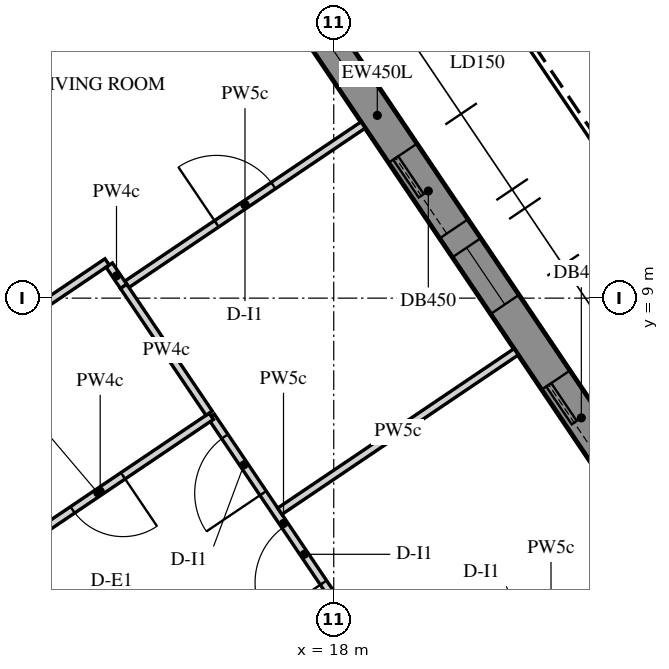
"""IFC4 building model, lengths in metres.
Left out: names, types, materials, properties, quantities, classifications, styles, units other than length and angle.
Written with IfcOpenShell. Run it as: python <this file> out.ifc"""

import sys

from ifc_helpers import new_model, si_unit, direction, frame, frame_2d, origin, place, context, subcontext, project, spatial, polyline, rectangle, outline, extrude, element, fill, save


model = new_model("IFC4")
c1 = context("Model", 3, precision=1e-05, world=origin(), true_north=direction((0.0, 1.0)))
c2 = subcontext(c1, "Body", "Model", "MODEL_VIEW")
j1 = project(units=[si_unit("LENGTHUNIT", "METRE"), si_unit("PLANEANGLEUNIT", "RADIAN")], contexts=[c1])
p1 = place(None, origin())
s1 = spatial("IfcSite", under=j1, at=p1, CompositionType="ELEMENT")
p2 = place(p1, origin())
s2 = spatial("IfcBuilding", under=s1, at=p2, CompositionType="ELEMENT")
p3 = place(p2, frame((0.0, 0.0, 353.4)))
s3 = spatial("IfcBuildingStorey", under=s2, at=p3, CompositionType="ELEMENT", Elevation=353.4)
p4 = place(p3, frame((24.37, 2.811, -0.15), z_axis=(0.0, 0.0, 1.0), x_axis=(-0.559187034749, 0.829041531027, 0.0)))
e1 = element("IfcWall", 1, at=p4, inside=s3, PredefinedType="SOLIDWALL", context=c2, shape_type="SweptSolid", body=[
    extrude(outline(polyline([(0.225, -0.225), (20.506, -0.225), (20.957, 0.225), (-0.225, 0.225), (0.225, -0.225)])), origin(), (0.0, 0.0, 1.0), 3.9),
])
p5 = place(p4, frame((0.325, 0.0, 1.05)))
e2 = element("IfcOpeningElement", 2, at=p5, cuts=e1, PredefinedType="OPENING", context=c2, shape_type="SweptSolid", body=[
    extrude(rectangle(XDim=0.9, YDim=1.5, at=frame_2d((0.45, 0.75))), frame((0.0, 0.235, 0.0), z_axis=(0.0, -1.0, 0.0), x_axis=(1.0, 0.0, 0.0)), (0.0, 0.0, 1.0), 0.47),
])
p6 = place(p4, frame((1.525, 0.0, 0.15)))
e3 = element("IfcOpeningElement", 3, at=p6, cuts=e1, PredefinedType="OPENING", context=c2, shape_type="SweptSolid", body=[
    extrude(rectangle(XDim=1.2, YDim=2.4, at=frame_2d((0.6, 1.2))), frame((0.0, 0.235, 0.0), z_axis=(0.0, -1.0, 0.0), x_axis=(1.0, 0.0, 0.0)), (0.0, 0.0, 1.0), 0.47),
])
p7 = place(p4, frame((3.766, 0.0, 1.05)))
e4 = element("IfcOpeningElement", 4, at=p7, cuts=e1, PredefinedType="OPENING", context=c2, shape_type="SweptSolid", body=[
    extrude(rectangle(XDim=0.9, YDim=1.5, at=frame_2d((0.45, 0.75))), frame((0.0, 0.235, 0.0), z_axis=(0.0, -1.0, 0.0), x_axis=(1.0, 0.0, 0.0)), (0.0, 0.0, 1.0), 0.47),
])
p8 = place(p4, frame((4.966, 0.0, 0.15)))
e5 = element("IfcOpeningElement", 5, at=p8, cuts=e1, PredefinedType="OPENING", context=c2, shape_type="SweptSolid", body=[
    extrude(rectangle(XDim=1.2, YDim=2.4, at=frame_2d((0.6, 1.2))), frame((0.0, 0.235, 0.0), z_axis=(0.0, -1.0, 0.0), x_axis=(1.0, 0.0, 0.0)), (0.0, 0.0, 1.0), 0.47),
])
p9 = place(p4, frame((7.366, 0.0, 1.05)))
e6 = element("IfcOpeningElement", 6, at=p9, cuts=e1, PredefinedType="OPENING", context=c2, shape_type="SweptSolid", body=[
    extrude(rectangle(XDim=0.9, YDim=1.5, at=frame_2d((0.45, 0.75))), frame((0.0, 0.235, 0.0), z_axis=(0.0, -1.0, 0.0), x_axis=(1.0, 0.0, 0.0)), (0.0, 0.0, 1.0), 0.47),
])
p10 = place(p4, frame((8.566, 0.0, 0.15)))
e7 = element("IfcOpeningElement", 7, at=p10, cuts=e1, PredefinedType="OPENING", context=c2, shape_type="SweptSolid", body=[
    extrude(rectangle(XDim=1.2, YDim=2.4, at=frame_2d((0.6, 1.2))), frame((0.0, 0.235, 0.0), z_axis=(0.0, -1.0, 0.0), x_axis=(1.0, 0.0, 0.0)), (0.0, 0.0, 1.0), 0.47),
])
p11 = place(p4, frame((10.966, 0.0, 1.05)))
e8 = element("IfcOpeningElement", 8, at=p11, cuts=e1, PredefinedType="OPENING", context=c2, shape_type="SweptSolid", body=[
    extrude(rectangle(XDim=0.9, YDim=1.5, at=frame_2d((0.45, 0.75))), frame((0.0, 0.235, 0.0), z_axis=(0.0, -1.0, 0.0), x_axis=(1.0, 0.0, 0.0)), (0.0, 0.0, 1.0), 0.47),
])
p12 = place(p4, frame((12.166, 0.0, 0.15)))
e9 = element("IfcOpeningElement", 9, at=p12, cuts=e1, PredefinedType="OPENING", context=c2, shape_type="SweptSolid", body=[
    extrude(rectangle(XDim=1.2, YDim=2.4, at=frame_2d((0.6, 1.2))), frame((0.0, 0.235, 0.0), z_axis=(0.0, -1.0, 0.0), x_axis=(1.0, 0.0, 0.0)), (0.0, 0.0, 1.0), 0.47),
])
p13 = place(p4, frame((14.566, 0.0, 1.05)))
e10 = element("IfcOpeningElement", 10, at=p13, cuts=e1, PredefinedType="OPENING", context=c2, shape_type="SweptSolid", body=[
    extrude(rectangle(XDim=0.9, YDim=1.5, at=frame_2d((0.45, 0.75))), frame((0.0, 0.235, 0.0), z_axis=(0.0, -1.0, 0.0), x_axis=(1.0, 0.0, 0.0)), (0.0, 0.0, 1.0), 0.47),
])
p14 = place(p4, frame((15.766, 0.0, 0.15)))
e11 = element("IfcOpeningElement", 11, at=p14, cuts=e1, PredefinedType="OPENING", context=c2, shape_type="SweptSolid", body=[
    extrude(rectangle(XDim=1.2, YDim=2.4, at=frame_2d((0.6, 1.2))), frame((0.0, 0.235, 0.0), z_axis=(0.0, -1.0, 0.0), x_axis=(1.0, 0.0, 0.0)), (0.0, 0.0, 1.0), 0.47),
])
p15 = place(p4, frame((18.007, 0.0, 1.05)))
e12 = element("IfcOpeningElement", 12, at=p15, cuts=e1, PredefinedType="OPENING", context=c2, shape_type="SweptSolid", body=[
    extrude(rectangle(XDim=0.9, YDim=1.5, at=frame_2d((0.45, 0.75))), frame((0.0, 0.235, 0.0), z_axis=(0.0, -1.0, 0.0), x_axis=(1.0, 0.0, 0.0)), (0.0, 0.0, 1.0), 0.47),
])
p16 = place(p4, frame((19.207, 0.0, 0.15)))
e13 = element("IfcOpeningElement", 13, at=p16, cuts=e1, PredefinedType="OPENING", context=c2, shape_type="SweptSolid", body=[
    extrude(rectangle(XDim=1.2, YDim=2.4, at=frame_2d((0.6, 1.2))), frame((0.0, 0.235, 0.0), z_axis=(0.0, -1.0, 0.0), x_axis=(1.0, 0.0, 0.0)), (0.0, 0.0, 1.0), 0.47),
])
p17 = place(p3, frame((17.873, -1.193, 0.0), z_axis=(0.0, 0.0, 1.0), x_axis=(-0.559195650252, 0.829035719821, 0.0)))
e14 = element("IfcWall", 14, at=p17, inside=s3, PredefinedType="PARTITIONING", context=c2, shape_type="SweptSolid", body=[
    extrude(rectangle(XDim=15.688, YDim=0.15, at=frame_2d((7.844, 0.0))), origin(), (0.0, 0.0, 1.0), 2.82),
])
p18 = place(p17, frame((5.792, 0.0, 0.0)))
e15 = element("IfcOpeningElement", 15, at=p18, cuts=e14, PredefinedType="OPENING", context=c2, shape_type="SweptSolid", body=[
    extrude(rectangle(XDim=1.0, YDim=2.1, at=frame_2d((0.5, 1.05))), frame((0.0, 0.085, 0.0), z_axis=(0.0, -1.0, 0.0), x_axis=(1.0, 0.0, 0.0)), (0.0, 0.0, 1.0), 0.17),
])
p19 = place(p3, frame((11.368, 5.231, 0.0), z_axis=(0.0, 0.0, 1.0), x_axis=(0.55919388604, -0.829036909803, 0.0)))
e16 = element("IfcWall", 16, at=p19, inside=s3, PredefinedType="PARTITIONING", context=c2, shape_type="SweptSolid", body=[
    extrude(rectangle(XDim=7.922, YDim=0.15, at=frame_2d((3.961, 0.0))), origin(), (0.0, 0.0, 1.0), 2.82),
])
p20 = place(p19, frame((3.511, 0.0, 0.0)))
e17 = element("IfcOpeningElement", 17, at=p20, cuts=e16, PredefinedType="OPENING", context=c2, shape_type="SweptSolid", body=[
    extrude(rectangle(XDim=0.9, YDim=2.1, at=frame_2d((0.45, 1.05))), frame((0.0, 0.085, 0.0), z_axis=(0.0, -1.0, 0.0), x_axis=(1.0, 0.0, 0.0)), (0.0, 0.0, 1.0), 0.17),
])
p21 = place(p3, frame((15.278, 9.181, 0.0), z_axis=(0.0, 0.0, 1.0), x_axis=(0.829043350963, 0.559184336534, 0.0)))
e18 = element("IfcWall", 18, at=p21, inside=s3, PredefinedType="PARTITIONING", context=c2, shape_type="SweptSolid", body=[
    extrude(rectangle(XDim=3.75, YDim=0.1, at=frame_2d((1.875, 0.0))), origin(), (0.0, 0.0, 1.0), 2.82),
])
p22 = place(p21, frame((1.425, 0.0, 0.0)))
e19 = element("IfcOpeningElement", 19, at=p22, cuts=e18, PredefinedType="OPENING", context=c2, shape_type="SweptSolid", body=[
    extrude(rectangle(XDim=0.9, YDim=2.1, at=frame_2d((0.45, 1.05))), frame((0.0, 0.06, 0.0), z_axis=(0.0, -1.0, 0.0), x_axis=(1.0, 0.0, 0.0)), (0.0, 0.0, 1.0), 0.12),
])
p23 = place(p3, frame((12.096, 7.505, 0.0), z_axis=(0.0, 0.0, 1.0), x_axis=(0.829065408555, 0.559151632687, 0.0)))
e20 = element("IfcWall", 20, at=p23, inside=s3, PredefinedType="PARTITIONING", context=c2, shape_type="SweptSolid", body=[
    extrude(rectangle(XDim=3.525, YDim=0.1, at=frame_2d((1.762, 0.0))), origin(), (0.0, 0.0, 1.0), 2.82),
])
p24 = place(p3, frame((15.046, 9.435, 0.0), z_axis=(0.0, 0.0, 1.0), x_axis=(0.559141668278, -0.829072128826, 0.0)))
e21 = element("IfcWall", 21, at=p24, inside=s3, PredefinedType="PARTITIONING", context=c2, shape_type="SweptSolid", body=[
    extrude(rectangle(XDim=0.342, YDim=0.1, at=frame_2d((0.171, 0.0))), origin(), (0.0, 0.0, 1.0), 2.82),
])
p25 = place(p3, frame((18.291, 4.625, 0.0), z_axis=(0.0, 0.0, 1.0), x_axis=(-0.55916115895, 0.82905898362, 0.0)))
e22 = element("IfcWall", 22, at=p25, inside=s3, PredefinedType="PARTITIONING", context=c2, shape_type="SweptSolid", body=[
    extrude(rectangle(XDim=3.404, YDim=0.1, at=frame_2d((1.702, 0.0))), origin(), (0.0, 0.0, 1.0), 2.82),
])
p26 = place(p25, frame((0.762, 0.0, 0.0)))
e23 = element("IfcOpeningElement", 23, at=p26, cuts=e22, PredefinedType="OPENING", context=c2, shape_type="SweptSolid", body=[
    extrude(rectangle(XDim=0.9, YDim=2.1, at=frame_2d((0.45, 1.05))), frame((0.0, 0.06, 0.0), z_axis=(0.0, -1.0, 0.0), x_axis=(1.0, 0.0, 0.0)), (0.0, 0.0, 1.0), 0.12),
])
p27 = place(p25, frame((2.182, 0.0, 0.0)))
e24 = element("IfcOpeningElement", 24, at=p27, cuts=e22, PredefinedType="OPENING", context=c2, shape_type="SweptSolid", body=[
    extrude(rectangle(XDim=0.9, YDim=2.1, at=frame_2d((0.45, 1.05))), frame((0.0, 0.06, 0.0), z_axis=(0.0, -1.0, 0.0), x_axis=(1.0, 0.0, 0.0)), (0.0, 0.0, 1.0), 0.12),
])
p28 = place(p3, frame((16.388, 7.445, 0.0), z_axis=(0.0, 0.0, 1.0), x_axis=(-0.829033300448, -0.559199237078, 0.0)))
e25 = element("IfcWall", 25, at=p28, inside=s3, PredefinedType="PARTITIONING", context=c2, shape_type="SweptSolid", body=[
    extrude(rectangle(XDim=3.525, YDim=0.1, at=frame_2d((1.763, 0.0))), origin(), (0.0, 0.0, 1.0), 2.82),
])
p29 = place(p28, frame((1.4, 0.0, 0.0)))
e26 = element("IfcOpeningElement", 26, at=p29, cuts=e25, PredefinedType="OPENING", context=c2, shape_type="SweptSolid", body=[
    extrude(rectangle(XDim=0.8, YDim=2.1, at=frame_2d((0.4, 1.05))), frame((0.0, 0.06, 0.0), z_axis=(0.0, -1.0, 0.0), x_axis=(1.0, 0.0, 0.0)), (0.0, 0.0, 1.0), 0.12),
])
p30 = place(p3, frame((22.413, 5.309, 0.0), z_axis=(0.0, 0.0, 1.0), x_axis=(-0.829013169089, -0.559229081394, 0.0)))
e27 = element("IfcWall", 27, at=p30, inside=s3, PredefinedType="PARTITIONING", context=c2, shape_type="SweptSolid", body=[
    extrude(rectangle(XDim=3.75, YDim=0.1, at=frame_2d((1.875, 0.0))), origin(), (0.0, 0.0, 1.0), 2.82),
])
p31 = place(p30, frame((2.7, 0.0, 0.0)))
e28 = element("IfcOpeningElement", 28, at=p31, cuts=e27, PredefinedType="OPENING", context=c2, shape_type="SweptSolid", body=[
    extrude(rectangle(XDim=0.9, YDim=2.1, at=frame_2d((0.45, 1.05))), frame((0.0, 0.06, 0.0), z_axis=(0.0, -1.0, 0.0), x_axis=(1.0, 0.0, 0.0)), (0.0, 0.0, 1.0), 0.12),
])
p32 = place(p30, frame((1.65, 0.0, 0.0)))
e29 = element("IfcOpeningElement", 29, at=p32, cuts=e27, PredefinedType="OPENING", context=c2, shape_type="SweptSolid", body=[
    extrude(rectangle(XDim=0.9, YDim=2.1, at=frame_2d((0.45, 1.05))), frame((0.0, 0.06, 0.0), z_axis=(0.0, -1.0, 0.0), x_axis=(1.0, 0.0, 0.0)), (0.0, 0.0, 1.0), 0.12),
])
p33 = place(p3, frame((20.4, 8.294, 0.0), z_axis=(0.0, 0.0, 1.0), x_axis=(-0.829043350963, -0.559184336534, 0.0)))
e30 = element("IfcWall", 30, at=p33, inside=s3, PredefinedType="PARTITIONING", context=c2, shape_type="SweptSolid", body=[
    extrude(rectangle(XDim=3.75, YDim=0.1, at=frame_2d((1.875, 0.0))), origin(), (0.0, 0.0, 1.0), 2.82),
])
p34 = place(p3, frame((15.235, 9.155, 0.0), z_axis=(0.0, 0.0, 1.0), x_axis=(0.559199850123, -0.829032886937, 0.0)))
e31 = element("IfcWall", 31, at=p34, inside=s3, PredefinedType="PARTITIONING", context=c2, shape_type="SweptSolid", body=[
    extrude(rectangle(XDim=2.012, YDim=0.1, at=frame_2d((1.006, 0.0))), origin(), (0.0, 0.0, 1.0), 2.82),
])
p35 = place(p8, frame((0.0, 0.15, 0.0)))
e32 = element("IfcDoor", 32, at=p35, inside=s3, OperationType="SLIDING_TO_LEFT", PredefinedType="DOOR", context=c2, shape_type="SweptSolid", body=[
    extrude(rectangle(XDim=1.2, YDim=2.4, at=frame_2d((0.6, 1.2))), frame((0.0, 0.025, 0.0), z_axis=(0.0, -1.0, 0.0), x_axis=(1.0, 0.0, 0.0)), (0.0, 0.0, 1.0), 0.05),
])
fill(e5, e32)
p36 = place(p9, frame((0.0, 0.155, 0.0)))
e33 = element("IfcWindow", 33, at=p36, inside=s3, PartitioningType="SINGLE_PANEL", PredefinedType="WINDOW", context=c2, shape_type="SweptSolid", body=[
    extrude(rectangle(XDim=0.9, YDim=1.5, at=frame_2d((0.45, 0.75))), frame((0.0, 0.03, 0.0), z_axis=(0.0, -1.0, 0.0), x_axis=(1.0, 0.0, 0.0)), (0.0, 0.0, 1.0), 0.06),
])
fill(e6, e33)
p37 = place(p10, frame((0.0, 0.15, 0.0)))
e34 = element("IfcDoor", 34, at=p37, inside=s3, OperationType="SLIDING_TO_LEFT", PredefinedType="DOOR", context=c2, shape_type="SweptSolid", body=[
    extrude(rectangle(XDim=1.2, YDim=2.4, at=frame_2d((0.6, 1.2))), frame((0.0, 0.025, 0.0), z_axis=(0.0, -1.0, 0.0), x_axis=(1.0, 0.0, 0.0)), (0.0, 0.0, 1.0), 0.05),
])
fill(e7, e34)
p38 = place(p11, frame((0.0, 0.155, 0.0)))
e35 = element("IfcWindow", 35, at=p38, inside=s3, PartitioningType="SINGLE_PANEL", PredefinedType="WINDOW", context=c2, shape_type="SweptSolid", body=[
    extrude(rectangle(XDim=0.9, YDim=1.5, at=frame_2d((0.45, 0.75))), frame((0.0, 0.03, 0.0), z_axis=(0.0, -1.0, 0.0), x_axis=(1.0, 0.0, 0.0)), (0.0, 0.0, 1.0), 0.06),
])
fill(e8, e35)
p39 = place(p26, origin())
e36 = element("IfcDoor", 36, at=p39, inside=s3, OperationType="SINGLE_SWING_LEFT", PredefinedType="DOOR", context=c2, shape_type="SweptSolid", body=[
    extrude(rectangle(XDim=0.9, YDim=2.1, at=frame_2d((0.45, 1.05))), frame((0.0, 0.025, 0.0), z_axis=(0.0, -1.0, 0.0), x_axis=(1.0, 0.0, 0.0)), (0.0, 0.0, 1.0), 0.05),
])
fill(e23, e36)
p40 = place(p27, origin())
e37 = element("IfcDoor", 37, at=p40, inside=s3, OperationType="SINGLE_SWING_LEFT", PredefinedType="DOOR", context=c2, shape_type="SweptSolid", body=[
    extrude(rectangle(XDim=0.9, YDim=2.1, at=frame_2d((0.45, 1.05))), frame((0.0, 0.025, 0.0), z_axis=(0.0, -1.0, 0.0), x_axis=(1.0, 0.0, 0.0)), (0.0, 0.0, 1.0), 0.05),
])
fill(e24, e37)
p41 = place(p29, origin())
e38 = element("IfcDoor", 38, at=p41, inside=s3, OperationType="SINGLE_SWING_LEFT", PredefinedType="DOOR", context=c2, shape_type="SweptSolid", body=[
    extrude(rectangle(XDim=0.8, YDim=2.1, at=frame_2d((0.4, 1.05))), frame((0.0, 0.025, 0.0), z_axis=(0.0, -1.0, 0.0), x_axis=(1.0, 0.0, 0.0)), (0.0, 0.0, 1.0), 0.05),
])
fill(e26, e38)
p42 = place(p22, origin())
e39 = element("IfcDoor", 39, at=p42, inside=s3, OperationType="SINGLE_SWING_RIGHT", PredefinedType="DOOR", context=c2, shape_type="SweptSolid", body=[
    extrude(rectangle(XDim=0.9, YDim=2.1, at=frame_2d((0.45, 1.05))), frame((0.0, 0.025, 0.0), z_axis=(0.0, -1.0, 0.0), x_axis=(1.0, 0.0, 0.0)), (0.0, 0.0, 1.0), 0.05),
])
fill(e19, e39)
save(model, sys.argv[1])
